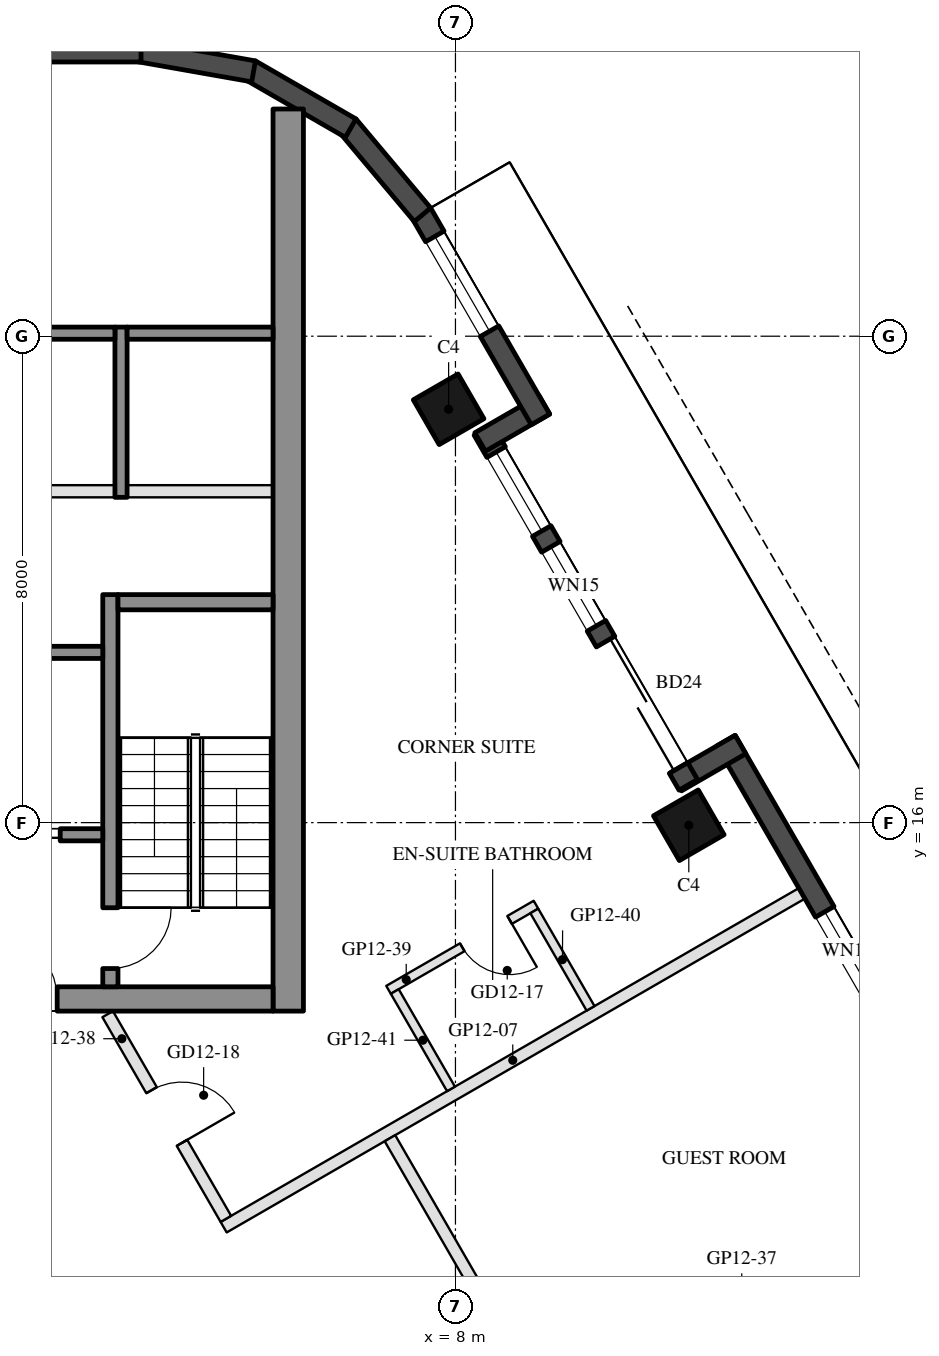
"""IFC4 building model, lengths in metres.
Left out: names, types, materials, properties, quantities, classifications, styles, units other than length and angle.
Written with IfcOpenShell. Run it as: python <this file> out.ifc"""

import sys

from ifc_helpers import new_model, si_unit, direction, frame, frame_2d, origin, origin_2d, place, context, subcontext, project, spatial, rectangle, hollow_rectangle, extrude, element, fill, save


model = new_model("IFC4")
c1 = context("Model", 3, precision=1e-05, world=origin(), true_north=direction((0.0, 1.0)))
c2 = subcontext(c1, "Body", "Model", "MODEL_VIEW")
j1 = project(units=[si_unit("LENGTHUNIT", "METRE"), si_unit("PLANEANGLEUNIT", "RADIAN")], contexts=[c1])
p1 = place(None, origin())
s1 = spatial("IfcSite", under=j1, at=p1, CompositionType="ELEMENT")
p2 = place(p1, origin())
s2 = spatial("IfcBuilding", under=s1, at=p2, CompositionType="ELEMENT")
p3 = place(p2, frame((0.0, 0.0, 146.6)))
s3 = spatial("IfcBuildingStorey", under=s2, at=p3, CompositionType="ELEMENT", Elevation=146.6)
for number, where, z_axis, x_axis in (
    (1, (11.838, 15.957, 0.0), (0.0, 0.0, 1.0), (-0.5, 0.866, 0.0)),
    (2, (7.888, 22.798, 0.0), (0.0, 0.0, 1.0), (-0.5, 0.866, 0.0)),
):
    element("IfcColumn", number, at=place(p3, frame(where, z_axis=z_axis, x_axis=x_axis)), inside=s3, PredefinedType="COLUMN", context=c2, shape_type="SweptSolid", body=[
        extrude(hollow_rectangle(XDim=0.85, YDim=0.85, WallThickness=0.04, at=origin_2d()), origin(), (0.0, 0.0, 1.0), 3.7),
    ])
p4 = place(p3, frame((17.299, 8.948, 0.0), z_axis=(0.0, 0.0, 1.0), x_axis=(-0.500010041276, 0.866019606374, 0.0)))
e3 = element("IfcWall", 3, at=p4, inside=s3, PredefinedType="SOLIDWALL", context=c2, shape_type="SweptSolid", body=[
    extrude(rectangle(XDim=9.7, YDim=0.35, at=frame_2d((4.85, 0.0))), origin(), (0.0, 0.0, 1.0), 3.55),
])
p5 = place(p4, frame((1.762, 0.0, 0.0)))
e4 = element("IfcOpeningElement", 4, at=p5, cuts=e3, PredefinedType="OPENING", context=c2, shape_type="SweptSolid", body=[
    extrude(rectangle(XDim=2.4, YDim=2.4, at=frame_2d((1.2, 1.2))), frame((0.0, 0.185, 0.0), z_axis=(0.0, -1.0, 0.0), x_axis=(1.0, 0.0, 0.0)), (0.0, 0.0, 1.0), 0.37),
])
p6 = place(p4, frame((4.949, 0.0, 0.3)))
e5 = element("IfcOpeningElement", 5, at=p6, cuts=e3, PredefinedType="OPENING", context=c2, shape_type="SweptSolid", body=[
    extrude(rectangle(XDim=1.5, YDim=2.65, at=frame_2d((0.75, 1.325))), frame((0.0, 0.185, 0.0), z_axis=(0.0, -1.0, 0.0), x_axis=(1.0, 0.0, 0.0)), (0.0, 0.0, 1.0), 0.37),
])
p7 = place(p3, frame((12.688, 17.284, 0.0), z_axis=(0.0, 0.0, 1.0), x_axis=(-0.865955602162, -0.500120880472, 0.0)))
e6 = element("IfcWall", 6, at=p7, inside=s3, PredefinedType="SOLIDWALL", context=c2, shape_type="SweptSolid", body=[
    extrude(rectangle(XDim=1.22, YDim=0.35, at=frame_2d((0.61, 0.0))), origin(), (0.0, 0.0, 1.0), 3.55),
])
p8 = place(p3, frame((11.829, 16.621, 0.0), z_axis=(0.0, 0.0, 1.0), x_axis=(-0.500003597184, 0.866023326939, 0.0)))
e7 = element("IfcWall", 7, at=p8, inside=s3, PredefinedType="SOLIDWALL", context=c2, shape_type="SweptSolid", body=[
    extrude(rectangle(XDim=6.74, YDim=0.35, at=frame_2d((3.37, 0.0))), origin(), (0.0, 0.0, 1.0), 3.55),
])
p9 = place(p8, frame((0.32, 0.0, 0.0)))
e8 = element("IfcOpeningElement", 8, at=p9, cuts=e7, PredefinedType="OPENING", context=c2, shape_type="SweptSolid", body=[
    extrude(rectangle(XDim=2.4, YDim=2.4, at=frame_2d((1.2, 1.2))), frame((0.0, 0.185, 0.0), z_axis=(0.0, -1.0, 0.0), x_axis=(1.0, 0.0, 0.0)), (0.0, 0.0, 1.0), 0.37),
])
p10 = place(p8, frame((3.02, 0.0, 0.3)))
e9 = element("IfcOpeningElement", 9, at=p10, cuts=e7, PredefinedType="OPENING", context=c2, shape_type="SweptSolid", body=[
    extrude(rectangle(XDim=1.5, YDim=2.65, at=frame_2d((0.75, 1.325))), frame((0.0, 0.185, 0.0), z_axis=(0.0, -1.0, 0.0), x_axis=(1.0, 0.0, 0.0)), (0.0, 0.0, 1.0), 0.37),
])
p11 = place(p8, frame((4.82, 0.0, 0.3)))
e10 = element("IfcOpeningElement", 10, at=p11, cuts=e7, PredefinedType="OPENING", context=c2, shape_type="SweptSolid", body=[
    extrude(rectangle(XDim=1.5, YDim=2.65, at=frame_2d((0.75, 1.325))), frame((0.0, 0.185, 0.0), z_axis=(0.0, -1.0, 0.0), x_axis=(1.0, 0.0, 0.0)), (0.0, 0.0, 1.0), 0.37),
])
p12 = place(p3, frame((8.406, 22.26, 0.0), z_axis=(0.0, 0.0, 1.0), x_axis=(0.865955602162, 0.500120880472, 0.0)))
e11 = element("IfcWall", 11, at=p12, inside=s3, PredefinedType="SOLIDWALL", context=c2, shape_type="SweptSolid", body=[
    extrude(rectangle(XDim=1.22, YDim=0.35, at=frame_2d((0.61, 0.0))), origin(), (0.0, 0.0, 1.0), 3.55),
])
p13 = place(p3, frame((9.398, 22.631, 0.0), z_axis=(0.0, 0.0, 1.0), x_axis=(-0.499954521343, 0.866051659307, 0.0)))
e12 = element("IfcWall", 12, at=p13, inside=s3, PredefinedType="SOLIDWALL", context=c2, shape_type="SweptSolid", body=[
    extrude(rectangle(XDim=3.916, YDim=0.35, at=frame_2d((1.958, 0.0))), origin(), (0.0, 0.0, 1.0), 3.55),
])
p14 = place(p13, frame((1.675, 0.0, 0.3)))
e13 = element("IfcOpeningElement", 13, at=p14, cuts=e12, PredefinedType="OPENING", context=c2, shape_type="SweptSolid", body=[
    extrude(rectangle(XDim=1.8, YDim=2.65, at=frame_2d((0.9, 1.325))), frame((0.0, 0.185, 0.0), z_axis=(0.0, -1.0, 0.0), x_axis=(1.0, 0.0, 0.0)), (0.0, 0.0, 1.0), 0.37),
])
p15 = place(p3, frame((7.458, 25.998, 0.0), z_axis=(0.0, 0.0, 1.0), x_axis=(-0.642808304945, 0.766027077259, 0.0)))
e14 = element("IfcWall", 14, at=p15, inside=s3, PredefinedType="SOLIDWALL", context=c2, shape_type="SweptSolid", body=[
    extrude(rectangle(XDim=1.91, YDim=0.35, at=frame_2d((0.955, 0.0))), origin(), (0.0, 0.0, 1.0), 3.55),
])
for number, where, z_axis, x_axis in (
    (15, (6.277, 27.422, 0.0), (0.0, 0.0, 1.0), (-0.866, 0.5, 0.0)),
    (16, (4.68, 28.356, 0.0), (0.0, 0.0, 1.0), (-0.985, 0.174, 0.0)),
):
    element("IfcWall", number, at=place(p3, frame(where, z_axis=z_axis, x_axis=x_axis)), inside=s3, PredefinedType="SOLIDWALL", context=c2, shape_type="SweptSolid", body=[
        extrude(rectangle(XDim=1.91, YDim=0.35, at=frame_2d((0.955, 0.0))), origin(), (0.0, 0.0, 1.0), 3.55),
    ])
p16 = place(p3, frame((2.829, 28.685, 0.0), z_axis=(0.0, 0.0, 1.0), x_axis=(-1.0, 0.0, 0.0)))
e17 = element("IfcWall", 17, at=p16, inside=s3, PredefinedType="SOLIDWALL", context=c2, shape_type="SweptSolid", body=[
    extrude(rectangle(XDim=5.658, YDim=0.35, at=frame_2d((2.829, 0.0))), origin(), (0.0, 0.0, 1.0), 3.55),
])
p17 = place(p3, frame((5.25, 12.9, 0.0), z_axis=(0.0, 0.0, 1.0), x_axis=(0.0, 1.0, 0.0)))
e18 = element("IfcWall", 18, at=p17, inside=s3, PredefinedType="SHEAR", context=c2, shape_type="SweptSolid", body=[
    extrude(rectangle(XDim=14.837, YDim=0.5, at=frame_2d((7.418, 0.0))), origin(), (0.0, 0.0, 1.0), 3.5),
])
p18 = place(p3, frame((5.0, 13.1, 0.0), z_axis=(0.0, 0.0, 1.0), x_axis=(-1.0, 0.0, 0.0)))
e19 = element("IfcWall", 19, at=p18, inside=s3, PredefinedType="SHEAR", context=c2, shape_type="SweptSolid", body=[
    extrude(rectangle(XDim=10.0, YDim=0.4, at=frame_2d((5.0, 0.0))), origin(), (0.0, 0.0, 1.0), 3.5),
])
p19 = place(p18, frame((3.55, 0.0, 0.0)))
e20 = element("IfcOpeningElement", 20, at=p19, cuts=e19, PredefinedType="OPENING", context=c2, shape_type="SweptSolid", body=[
    extrude(rectangle(XDim=1.1, YDim=2.1, at=frame_2d((0.55, 1.05))), frame((0.0, 0.21, 0.0), z_axis=(0.0, -1.0, 0.0), x_axis=(1.0, 0.0, 0.0)), (0.0, 0.0, 1.0), 0.42),
])
p20 = place(p18, frame((5.85, 0.0, 0.0)))
e21 = element("IfcOpeningElement", 21, at=p20, cuts=e19, PredefinedType="OPENING", context=c2, shape_type="SweptSolid", body=[
    extrude(rectangle(XDim=1.4, YDim=2.1, at=frame_2d((0.7, 1.05))), frame((0.0, 0.21, 0.0), z_axis=(0.0, -1.0, 0.0), x_axis=(1.0, 0.0, 0.0)), (0.0, 0.0, 1.0), 0.42),
])
p21 = place(p3, frame((2.325, 13.3, 0.0), z_axis=(0.0, 0.0, 1.0), x_axis=(0.0, 1.0, 0.0)))
e22 = element("IfcWall", 22, at=p21, inside=s3, PredefinedType="SHEAR", context=c2, shape_type="SweptSolid", body=[
    extrude(rectangle(XDim=6.45, YDim=0.25, at=frame_2d((3.225, 0.0))), origin(), (0.0, 0.0, 1.0), 3.5),
])
p22 = place(p21, frame((0.3, 0.0, 0.0)))
e23 = element("IfcOpeningElement", 23, at=p22, cuts=e22, PredefinedType="OPENING", context=c2, shape_type="SweptSolid", body=[
    extrude(rectangle(XDim=1.0, YDim=2.1, at=frame_2d((0.5, 1.05))), frame((0.0, 0.135, 0.0), z_axis=(0.0, -1.0, 0.0), x_axis=(1.0, 0.0, 0.0)), (0.0, 0.0, 1.0), 0.27),
])
p23 = place(p3, frame((5.0, 19.625, 0.0), z_axis=(0.0, 0.0, 1.0), x_axis=(-1.0, 0.0, 0.0)))
e24 = element("IfcWall", 24, at=p23, inside=s3, PredefinedType="SHEAR", context=c2, shape_type="SweptSolid", body=[
    extrude(rectangle(XDim=2.55, YDim=0.25, at=frame_2d((1.275, 0.0))), origin(), (0.0, 0.0, 1.0), 3.5),
])
p24 = place(p3, frame((2.2, 18.8, 0.0), z_axis=(0.0, 0.0, 1.0), x_axis=(-1.0, 0.0, 0.0)))
e25 = element("IfcWall", 25, at=p24, inside=s3, PredefinedType="SHEAR", context=c2, shape_type="SweptSolid", body=[
    extrude(rectangle(XDim=2.8, YDim=0.2, at=frame_2d((1.4, 0.0))), origin(), (0.0, 0.0, 1.0), 3.5),
])
p25 = place(p3, frame((2.2, 15.8, 0.0), z_axis=(0.0, 0.0, 1.0), x_axis=(-1.0, 0.0, 0.0)))
e26 = element("IfcWall", 26, at=p25, inside=s3, PredefinedType="SHEAR", context=c2, shape_type="SweptSolid", body=[
    extrude(rectangle(XDim=2.8, YDim=0.2, at=frame_2d((1.4, 0.0))), origin(), (0.0, 0.0, 1.0), 3.5),
])
p26 = place(p25, frame((0.7, 0.0, 0.0)))
e27 = element("IfcOpeningElement", 27, at=p26, cuts=e26, PredefinedType="OPENING", context=c2, shape_type="SweptSolid", body=[
    extrude(rectangle(XDim=1.2, YDim=2.1, at=frame_2d((0.6, 1.05))), frame((0.0, 0.11, 0.0), z_axis=(0.0, -1.0, 0.0), x_axis=(1.0, 0.0, 0.0)), (0.0, 0.0, 1.0), 0.22),
])
p27 = place(p3, frame((2.5, 21.35, 0.0), z_axis=(0.0, 0.0, 1.0), x_axis=(0.0, 1.0, 0.0)))
e28 = element("IfcWall", 28, at=p27, inside=s3, PredefinedType="SHEAR", context=c2, shape_type="SweptSolid", body=[
    extrude(rectangle(XDim=2.8, YDim=0.2, at=frame_2d((1.4, 0.0))), origin(), (0.0, 0.0, 1.0), 3.5),
])
p28 = place(p3, frame((5.0, 24.05, 0.0), z_axis=(0.0, 0.0, 1.0), x_axis=(-1.0, 0.0, 0.0)))
e29 = element("IfcWall", 29, at=p28, inside=s3, PredefinedType="SHEAR", context=c2, shape_type="SweptSolid", body=[
    extrude(rectangle(XDim=2.4, YDim=0.2, at=frame_2d((1.2, 0.0))), origin(), (0.0, 0.0, 1.0), 3.5),
])
p29 = place(p3, frame((2.4, 24.05, 0.0), z_axis=(0.0, 0.0, 1.0), x_axis=(-1.0, 0.0, 0.0)))
e30 = element("IfcWall", 30, at=p29, inside=s3, PredefinedType="SHEAR", context=c2, shape_type="SweptSolid", body=[
    extrude(rectangle(XDim=2.8, YDim=0.2, at=frame_2d((1.4, 0.0))), origin(), (0.0, 0.0, 1.0), 3.5),
])
p30 = place(p3, frame((5.0, 21.45, 0.0), z_axis=(0.0, 0.0, 1.0), x_axis=(-1.0, 0.0, 0.0)))
e31 = element("IfcWall", 31, at=p30, inside=s3, PredefinedType="PARTITIONING", context=c2, shape_type="SweptSolid", body=[
    extrude(rectangle(XDim=2.4, YDim=0.2, at=frame_2d((1.2, 0.0))), origin(), (0.0, 0.0, 1.0), 3.5),
])
p31 = place(p3, frame((2.4, 21.45, 0.0), z_axis=(0.0, 0.0, 1.0), x_axis=(-1.0, 0.0, 0.0)))
e32 = element("IfcWall", 32, at=p31, inside=s3, PredefinedType="PARTITIONING", context=c2, shape_type="SweptSolid", body=[
    extrude(rectangle(XDim=2.8, YDim=0.2, at=frame_2d((1.4, 0.0))), origin(), (0.0, 0.0, 1.0), 3.5),
])
p32 = place(p3, frame((13.697, 14.836, 0.0), z_axis=(0.0, 0.0, 1.0), x_axis=(-0.866027479907, -0.499996404033, 0.0)))
e33 = element("IfcWall", 33, at=p32, inside=s3, PredefinedType="PARTITIONING", context=c2, shape_type="SweptSolid", body=[
    extrude(rectangle(XDim=10.98, YDim=0.2, at=frame_2d((5.49, 0.0))), origin(), (0.0, 0.0, 1.0), 3.06),
])
p33 = place(p3, frame((6.923, 10.81, 0.0), z_axis=(0.0, 0.0, 1.0), x_axis=(0.500007257026, -0.866021213898, 0.0)))
e34 = element("IfcWall", 34, at=p33, inside=s3, PredefinedType="PARTITIONING", context=c2, shape_type="SweptSolid", body=[
    extrude(rectangle(XDim=7.569, YDim=0.2, at=frame_2d((3.784, 0.0))), origin(), (0.0, 0.0, 1.0), 2.95),
])
p34 = place(p33, frame((4.121, 0.0, 0.0)))
e35 = element("IfcOpeningElement", 35, at=p34, cuts=e34, PredefinedType="OPENING", context=c2, shape_type="SweptSolid", body=[
    extrude(rectangle(XDim=1.0, YDim=2.1, at=frame_2d((0.5, 1.05))), frame((0.0, 0.11, 0.0), z_axis=(0.0, -1.0, 0.0), x_axis=(1.0, 0.0, 0.0)), (0.0, 0.0, 1.0), 0.22),
])
p35 = place(p3, frame((2.281, 12.85, 0.0), z_axis=(0.0, 0.0, 1.0), x_axis=(0.500008716408, -0.866020371305, 0.0)))
e36 = element("IfcWall", 36, at=p35, inside=s3, PredefinedType="PARTITIONING", context=c2, shape_type="SweptSolid", body=[
    extrude(rectangle(XDim=3.888, YDim=0.2, at=frame_2d((1.944, 0.0))), origin(), (0.0, 0.0, 1.0), 2.95),
])
p36 = place(p35, frame((1.444, 0.0, 0.0)))
e37 = element("IfcOpeningElement", 37, at=p36, cuts=e36, PredefinedType="OPENING", context=c2, shape_type="SweptSolid", body=[
    extrude(rectangle(XDim=1.0, YDim=2.1, at=frame_2d((0.5, 1.05))), frame((0.0, 0.11, 0.0), z_axis=(0.0, -1.0, 0.0), x_axis=(1.0, 0.0, 0.0)), (0.0, 0.0, 1.0), 0.22),
])
p37 = place(p3, frame((9.324, 14.65, 0.0), z_axis=(0.0, 0.0, 1.0), x_axis=(-0.866034573852, -0.49998411664, 0.0)))
e38 = element("IfcWall", 38, at=p37, inside=s3, PredefinedType="PARTITIONING", context=c2, shape_type="SweptSolid", body=[
    extrude(rectangle(XDim=2.8, YDim=0.15, at=frame_2d((1.4, 0.0))), origin(), (0.0, 0.0, 1.0), 2.95),
])
p38 = place(p37, frame((0.5, 0.0, 0.0)))
e39 = element("IfcOpeningElement", 39, at=p38, cuts=e38, PredefinedType="OPENING", context=c2, shape_type="SweptSolid", body=[
    extrude(rectangle(XDim=0.9, YDim=2.1, at=frame_2d((0.45, 1.05))), frame((0.0, 0.085, 0.0), z_axis=(0.0, -1.0, 0.0), x_axis=(1.0, 0.0, 0.0)), (0.0, 0.0, 1.0), 0.17),
])
for number, where, z_axis, x_axis in (
    (40, (10.222, 12.945, 0.0), (0.0, 0.0, 1.0), (-0.5, 0.866, 0.0)),
    (41, (7.927, 11.62, 0.0), (0.0, 0.0, 1.0), (-0.5, 0.866, 0.0)),
):
    element("IfcWall", number, at=place(p3, frame(where, z_axis=z_axis, x_axis=x_axis)), inside=s3, PredefinedType="PARTITIONING", context=c2, shape_type="SweptSolid", body=[
        extrude(rectangle(XDim=1.85, YDim=0.15, at=frame_2d((0.925, 0.0))), origin(), (0.0, 0.0, 1.0), 2.95),
    ])
p39 = place(p6, origin())
e42 = element("IfcWindow", 42, at=p39, inside=s3, PartitioningType="SINGLE_PANEL", PredefinedType="WINDOW", context=c2, shape_type="SweptSolid", body=[
    extrude(rectangle(XDim=1.5, YDim=2.65, at=frame_2d((0.75, 1.325))), frame((0.0, 0.03, 0.0), z_axis=(0.0, -1.0, 0.0), x_axis=(1.0, 0.0, 0.0)), (0.0, 0.0, 1.0), 0.06),
])
fill(e5, e42)
p40 = place(p9, frame((2.4, 0.0, 0.0), z_axis=(0.0, 0.0, 1.0), x_axis=(-1.0, 0.0, 0.0)))
e43 = element("IfcDoor", 43, at=p40, inside=s3, OperationType="SLIDING_TO_LEFT", PredefinedType="DOOR", context=c2, shape_type="SweptSolid", body=[
    extrude(rectangle(XDim=2.4, YDim=2.4, at=frame_2d((1.2, 1.2))), frame((0.0, 0.025, 0.0), z_axis=(0.0, -1.0, 0.0), x_axis=(1.0, 0.0, 0.0)), (0.0, 0.0, 1.0), 0.05),
])
fill(e8, e43)
p41 = place(p10, origin())
e44 = element("IfcWindow", 44, at=p41, inside=s3, PartitioningType="SINGLE_PANEL", PredefinedType="WINDOW", context=c2, shape_type="SweptSolid", body=[
    extrude(rectangle(XDim=1.5, YDim=2.65, at=frame_2d((0.75, 1.325))), frame((0.0, 0.03, 0.0), z_axis=(0.0, -1.0, 0.0), x_axis=(1.0, 0.0, 0.0)), (0.0, 0.0, 1.0), 0.06),
])
fill(e9, e44)
p42 = place(p11, origin())
e45 = element("IfcWindow", 45, at=p42, inside=s3, PartitioningType="SINGLE_PANEL", PredefinedType="WINDOW", context=c2, shape_type="SweptSolid", body=[
    extrude(rectangle(XDim=1.5, YDim=2.65, at=frame_2d((0.75, 1.325))), frame((0.0, 0.03, 0.0), z_axis=(0.0, -1.0, 0.0), x_axis=(1.0, 0.0, 0.0)), (0.0, 0.0, 1.0), 0.06),
])
fill(e10, e45)
p43 = place(p14, origin())
e46 = element("IfcWindow", 46, at=p43, inside=s3, PartitioningType="SINGLE_PANEL", PredefinedType="WINDOW", context=c2, shape_type="SweptSolid", body=[
    extrude(rectangle(XDim=1.8, YDim=2.65, at=frame_2d((0.9, 1.325))), frame((0.0, 0.03, 0.0), z_axis=(0.0, -1.0, 0.0), x_axis=(1.0, 0.0, 0.0)), (0.0, 0.0, 1.0), 0.06),
])
fill(e13, e46)
p44 = place(p26, origin())
e47 = element("IfcDoor", 47, at=p44, inside=s3, OperationType="DOUBLE_DOOR_SLIDING", PredefinedType="DOOR", context=c2, shape_type="SweptSolid", body=[
    extrude(rectangle(XDim=1.2, YDim=2.1, at=frame_2d((0.6, 1.05))), frame((0.0, 0.025, 0.0), z_axis=(0.0, -1.0, 0.0), x_axis=(1.0, 0.0, 0.0)), (0.0, 0.0, 1.0), 0.05),
])
fill(e27, e47)
p45 = place(p19, frame((1.1, 0.0, 0.0), z_axis=(0.0, 0.0, 1.0), x_axis=(-1.0, 0.0, 0.0)))
e48 = element("IfcDoor", 48, at=p45, inside=s3, OperationType="SINGLE_SWING_LEFT", PredefinedType="DOOR", context=c2, shape_type="SweptSolid", body=[
    extrude(rectangle(XDim=1.1, YDim=2.1, at=frame_2d((0.55, 1.05))), frame((0.0, 0.025, 0.0), z_axis=(0.0, -1.0, 0.0), x_axis=(1.0, 0.0, 0.0)), (0.0, 0.0, 1.0), 0.05),
])
fill(e20, e48)
p46 = place(p22, frame((1.0, 0.0, 0.0), z_axis=(0.0, 0.0, 1.0), x_axis=(-1.0, 0.0, 0.0)))
e49 = element("IfcDoor", 49, at=p46, inside=s3, OperationType="SINGLE_SWING_LEFT", PredefinedType="DOOR", context=c2, shape_type="SweptSolid", body=[
    extrude(rectangle(XDim=1.0, YDim=2.1, at=frame_2d((0.5, 1.05))), frame((0.0, 0.025, 0.0), z_axis=(0.0, -1.0, 0.0), x_axis=(1.0, 0.0, 0.0)), (0.0, 0.0, 1.0), 0.05),
])
fill(e23, e49)
p47 = place(p38, origin())
e50 = element("IfcDoor", 50, at=p47, inside=s3, OperationType="SINGLE_SWING_LEFT", PredefinedType="DOOR", context=c2, shape_type="SweptSolid", body=[
    extrude(rectangle(XDim=0.9, YDim=2.1, at=frame_2d((0.45, 1.05))), frame((0.0, 0.025, 0.0), z_axis=(0.0, -1.0, 0.0), x_axis=(1.0, 0.0, 0.0)), (0.0, 0.0, 1.0), 0.05),
])
fill(e39, e50)
p48 = place(p36, origin())
e51 = element("IfcDoor", 51, at=p48, inside=s3, OperationType="SINGLE_SWING_RIGHT", PredefinedType="DOOR", context=c2, shape_type="SweptSolid", body=[
    extrude(rectangle(XDim=1.0, YDim=2.1, at=frame_2d((0.5, 1.05))), frame((0.0, 0.025, 0.0), z_axis=(0.0, -1.0, 0.0), x_axis=(1.0, 0.0, 0.0)), (0.0, 0.0, 1.0), 0.05),
])
fill(e37, e51)
save(model, sys.argv[1])
